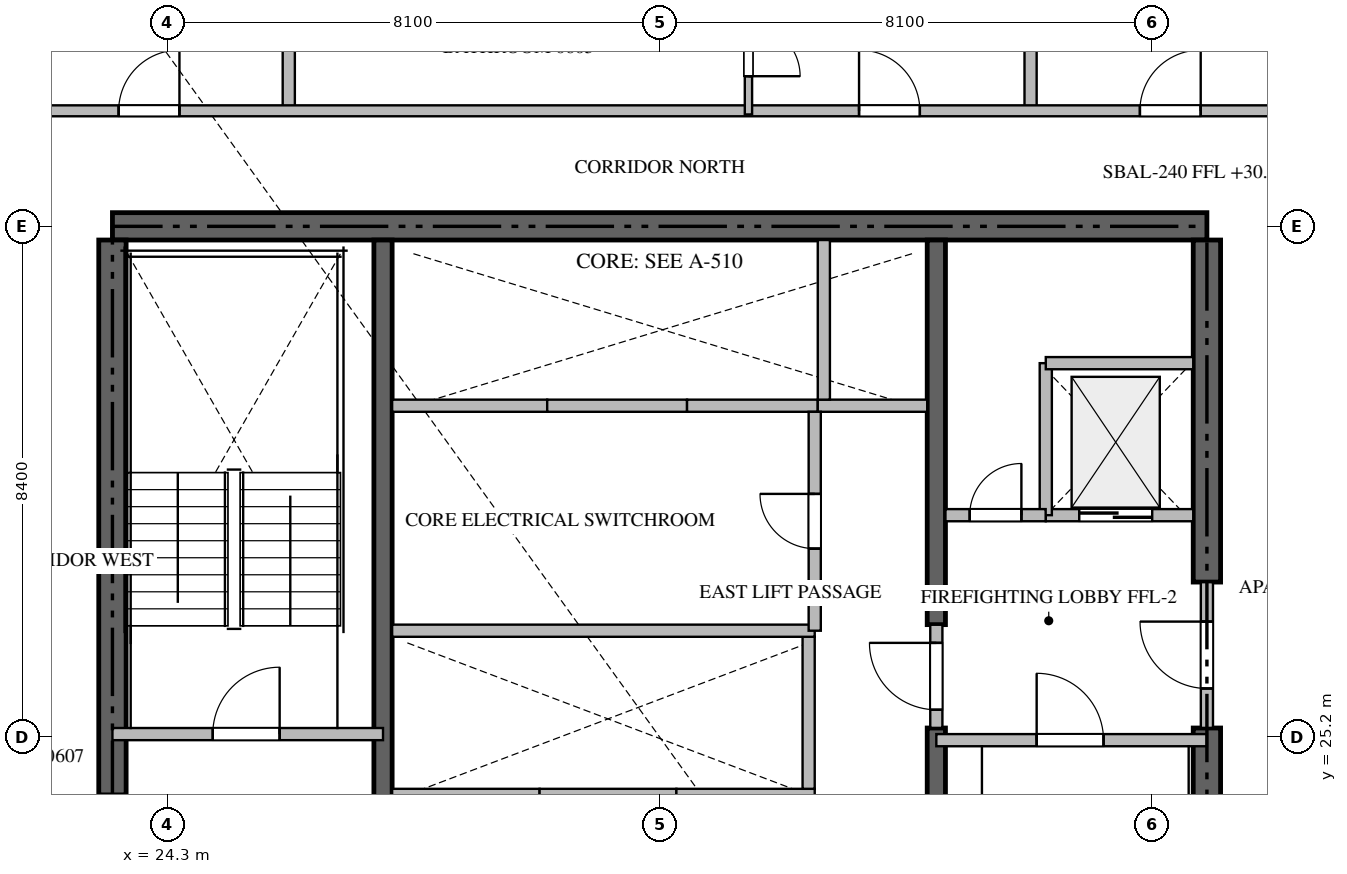
"""IFC4 building model, lengths in metres.
Left out: names, types, materials, properties, quantities, classifications, styles, units other than length and angle.
Written with IfcOpenShell. Run it as: python <this file> out.ifc"""

import sys

from ifc_helpers import new_model, si_unit, direction, frame, frame_2d, origin, place, context, subcontext, project, spatial, rectangle, extrude, source, transform, mapped, element, fill, save


model = new_model("IFC4")
c1 = context("Model", 3, precision=1e-05, world=origin(), true_north=direction((0.0, 1.0)))
c2 = subcontext(c1, "Body", "Model", "MODEL_VIEW")
j1 = project(units=[si_unit("LENGTHUNIT", "METRE"), si_unit("PLANEANGLEUNIT", "RADIAN")], contexts=[c1])
p1 = place(None, origin())
s1 = spatial("IfcSite", under=j1, at=p1, CompositionType="ELEMENT")
p2 = place(p1, origin())
s2 = spatial("IfcBuilding", under=s1, at=p2, CompositionType="ELEMENT")
p3 = place(p2, frame((0.0, 0.0, 30.45)))
s3 = spatial("IfcBuildingStorey", under=s2, at=p3, CompositionType="ELEMENT", Elevation=30.45)
p4 = place(p3, frame((41.4, 33.6, -0.26), z_axis=(0.0, 0.0, 1.0), x_axis=(-1.0, 0.0, 0.0)))
e1 = element("IfcWall", 1, at=p4, inside=s3, PredefinedType="SHEAR", context=c2, shape_type="SweptSolid", body=[
    extrude(rectangle(XDim=18.0, YDim=0.45, at=frame_2d((9.0, 0.0))), origin(), (0.0, 0.0, 1.0), 3.748),
])
p5 = place(p3, frame((23.4, 24.25, -0.26), z_axis=(0.0, 0.0, 1.0), x_axis=(0.0, 1.0, 0.0)))
e2 = element("IfcWall", 2, at=p5, inside=s3, PredefinedType="SHEAR", context=c2, shape_type="SweptSolid", body=[
    extrude(rectangle(XDim=9.125, YDim=0.45, at=frame_2d((4.562, 0.0))), origin(), (0.0, 0.0, 1.0), 3.748),
])
p6 = place(p3, frame((41.4, 17.025, -0.26), z_axis=(0.0, 0.0, 1.0), x_axis=(0.0, 1.0, 0.0)))
e3 = element("IfcWall", 3, at=p6, inside=s3, PredefinedType="SHEAR", context=c2, shape_type="SweptSolid", body=[
    extrude(rectangle(XDim=8.325, YDim=0.45, at=frame_2d((4.163, 0.0))), origin(), (0.0, 0.0, 1.0), 3.748),
])
p7 = place(p3, frame((41.4, 27.75, -0.26), z_axis=(0.0, 0.0, 1.0), x_axis=(0.0, 1.0, 0.0)))
e4 = element("IfcWall", 4, at=p7, inside=s3, PredefinedType="SHEAR", context=c2, shape_type="SweptSolid", body=[
    extrude(rectangle(XDim=5.625, YDim=0.45, at=frame_2d((2.812, 0.0))), origin(), (0.0, 0.0, 1.0), 3.748),
])
p8 = place(p3, frame((27.85, 23.55, -0.26), z_axis=(0.0, 0.0, 1.0), x_axis=(0.0, 1.0, 0.0)))
e5 = element("IfcWall", 5, at=p8, inside=s3, PredefinedType="SHEAR", context=c2, shape_type="SweptSolid", body=[
    extrude(rectangle(XDim=9.825, YDim=0.3, at=frame_2d((4.913, 0.0))), origin(), (0.0, 0.0, 1.0), 3.748),
])
p9 = place(p3, frame((36.95, 17.025, -0.26), z_axis=(0.0, 0.0, 1.0), x_axis=(0.0, 1.0, 0.0)))
e6 = element("IfcWall", 6, at=p9, inside=s3, PredefinedType="SHEAR", context=c2, shape_type="SweptSolid", body=[
    extrude(rectangle(XDim=8.325, YDim=0.3, at=frame_2d((4.163, 0.0))), origin(), (0.0, 0.0, 1.0), 3.748),
])
p10 = place(p3, frame((36.95, 27.05, -0.26), z_axis=(0.0, 0.0, 1.0), x_axis=(0.0, 1.0, 0.0)))
e7 = element("IfcWall", 7, at=p10, inside=s3, PredefinedType="SHEAR", context=c2, shape_type="SweptSolid", body=[
    extrude(rectangle(XDim=6.325, YDim=0.3, at=frame_2d((3.163, 0.0))), origin(), (0.0, 0.0, 1.0), 3.748),
])
p11 = place(p3, frame((23.4, 25.25, 0.0), z_axis=(0.0, 0.0, 1.0), x_axis=(1.0, 0.0, 0.0)))
e8 = element("IfcWall", 8, at=p11, inside=s3, PredefinedType="STANDARD", context=c2, shape_type="SweptSolid", body=[
    extrude(rectangle(XDim=4.45, YDim=0.2, at=frame_2d((2.225, 0.0))), origin(), (0.0, 0.0, 1.0), 3.49),
])
p12 = place(p11, frame((1.65, 0.0, 0.0)))
e9 = element("IfcOpeningElement", 9, at=p12, cuts=e8, PredefinedType="OPENING", context=c2, shape_type="SweptSolid", body=[
    extrude(rectangle(XDim=1.1, YDim=2.15, at=frame_2d((0.55, 1.075))), frame((0.0, 0.11, 0.0), z_axis=(0.0, -1.0, 0.0), x_axis=(1.0, 0.0, 0.0)), (0.0, 0.0, 1.0), 0.22),
])
p13 = place(p3, frame((36.95, 25.15, 0.0), z_axis=(0.0, 0.0, 1.0), x_axis=(1.0, 0.0, 0.0)))
e10 = element("IfcWall", 10, at=p13, inside=s3, PredefinedType="STANDARD", context=c2, shape_type="SweptSolid", body=[
    extrude(rectangle(XDim=4.45, YDim=0.2, at=frame_2d((2.225, 0.0))), origin(), (0.0, 0.0, 1.0), 3.49),
])
p14 = place(p13, frame((1.65, 0.0, 0.0)))
e11 = element("IfcOpeningElement", 11, at=p14, cuts=e10, PredefinedType="OPENING", context=c2, shape_type="SweptSolid", body=[
    extrude(rectangle(XDim=1.1, YDim=2.15, at=frame_2d((0.55, 1.075))), frame((0.0, 0.11, 0.0), z_axis=(0.0, -1.0, 0.0), x_axis=(1.0, 0.0, 0.0)), (0.0, 0.0, 1.0), 0.22),
])
p15 = place(p3, frame((38.75, 28.85, 0.0), z_axis=(0.0, 0.0, 1.0), x_axis=(1.0, 0.0, 0.0)))
e12 = element("IfcWall", 12, at=p15, inside=s3, PredefinedType="STANDARD", context=c2, shape_type="SweptSolid", body=[
    extrude(rectangle(XDim=2.425, YDim=0.2, at=frame_2d((1.212, 0.0))), origin(), (0.0, 0.0, 1.0), 3.49),
])
p16 = place(p15, frame((0.55, 0.0, 0.0)))
e13 = element("IfcOpeningElement", 13, at=p16, cuts=e12, PredefinedType="OPENING", context=c2, shape_type="SweptSolid", body=[
    extrude(rectangle(XDim=1.2, YDim=2.2, at=frame_2d((0.6, 1.1))), frame((0.0, 0.11, 0.0), z_axis=(0.0, -1.0, 0.0), x_axis=(1.0, 0.0, 0.0)), (0.0, 0.0, 1.0), 0.22),
])
p17 = place(p3, frame((28.0, 24.25, 0.0), z_axis=(0.0, 0.0, 1.0), x_axis=(1.0, 0.0, 0.0)))
e14 = element("IfcWall", 14, at=p17, inside=s3, PredefinedType="STANDARD", context=c2, shape_type="SweptSolid", body=[
    extrude(rectangle(XDim=2.425, YDim=0.2, at=frame_2d((1.212, 0.0))), origin(), (0.0, 0.0, 1.0), 3.49),
])
p18 = place(p3, frame((30.425, 24.25, 0.0), z_axis=(0.0, 0.0, 1.0), x_axis=(1.0, 0.0, 0.0)))
e15 = element("IfcWall", 15, at=p18, inside=s3, PredefinedType="STANDARD", context=c2, shape_type="SweptSolid", body=[
    extrude(rectangle(XDim=2.25, YDim=0.2, at=frame_2d((1.125, 0.0))), origin(), (0.0, 0.0, 1.0), 3.49),
])
p19 = place(p3, frame((32.675, 24.25, 0.0), z_axis=(0.0, 0.0, 1.0), x_axis=(1.0, 0.0, 0.0)))
e16 = element("IfcWall", 16, at=p19, inside=s3, PredefinedType="STANDARD", context=c2, shape_type="SweptSolid", body=[
    extrude(rectangle(XDim=2.275, YDim=0.2, at=frame_2d((1.137, 0.0))), origin(), (0.0, 0.0, 1.0), 3.49),
])
p20 = place(p3, frame((34.85, 24.35, 0.0), z_axis=(0.0, 0.0, 1.0), x_axis=(0.0, 1.0, 0.0)))
e17 = element("IfcWall", 17, at=p20, inside=s3, PredefinedType="STANDARD", context=c2, shape_type="SweptSolid", body=[
    extrude(rectangle(XDim=2.5, YDim=0.2, at=frame_2d((1.25, 0.0))), origin(), (0.0, 0.0, 1.0), 3.49),
])
p21 = place(p3, frame((28.0, 30.65, 0.0), z_axis=(0.0, 0.0, 1.0), x_axis=(1.0, 0.0, 0.0)))
e18 = element("IfcWall", 18, at=p21, inside=s3, PredefinedType="STANDARD", context=c2, shape_type="SweptSolid", body=[
    extrude(rectangle(XDim=2.55, YDim=0.2, at=frame_2d((1.275, 0.0))), origin(), (0.0, 0.0, 1.0), 3.49),
])
p22 = place(p3, frame((30.55, 30.65, 0.0), z_axis=(0.0, 0.0, 1.0), x_axis=(1.0, 0.0, 0.0)))
e19 = element("IfcWall", 19, at=p22, inside=s3, PredefinedType="STANDARD", context=c2, shape_type="SweptSolid", body=[
    extrude(rectangle(XDim=2.3, YDim=0.2, at=frame_2d((1.15, 0.0))), origin(), (0.0, 0.0, 1.0), 3.49),
])
p23 = place(p3, frame((32.85, 30.65, 0.0), z_axis=(0.0, 0.0, 1.0), x_axis=(1.0, 0.0, 0.0)))
e20 = element("IfcWall", 20, at=p23, inside=s3, PredefinedType="STANDARD", context=c2, shape_type="SweptSolid", body=[
    extrude(rectangle(XDim=2.15, YDim=0.2, at=frame_2d((1.075, 0.0))), origin(), (0.0, 0.0, 1.0), 3.49),
])
p24 = place(p3, frame((35.0, 30.65, 0.0), z_axis=(0.0, 0.0, 1.0), x_axis=(1.0, 0.0, 0.0)))
e21 = element("IfcWall", 21, at=p24, inside=s3, PredefinedType="STANDARD", context=c2, shape_type="SweptSolid", body=[
    extrude(rectangle(XDim=1.8, YDim=0.2, at=frame_2d((0.9, 0.0))), origin(), (0.0, 0.0, 1.0), 3.49),
])
p25 = place(p3, frame((35.1, 30.75, 0.0), z_axis=(0.0, 0.0, 1.0), x_axis=(0.0, 1.0, 0.0)))
e22 = element("IfcWall", 22, at=p25, inside=s3, PredefinedType="STANDARD", context=c2, shape_type="SweptSolid", body=[
    extrude(rectangle(XDim=2.625, YDim=0.2, at=frame_2d((1.312, 0.0))), origin(), (0.0, 0.0, 1.0), 3.49),
])
p26 = place(p3, frame((38.75, 28.85, 0.0), z_axis=(0.0, 0.0, 1.0), x_axis=(0.0, 1.0, 0.0)))
e23 = element("IfcWall", 23, at=p26, inside=s3, PredefinedType="STANDARD", context=c2, shape_type="SweptSolid", body=[
    extrude(rectangle(XDim=2.5, YDim=0.2, at=frame_2d((1.25, 0.0))), origin(), (0.0, 0.0, 1.0), 3.49),
])
p27 = place(p3, frame((38.75, 31.35, 0.0), z_axis=(0.0, 0.0, 1.0), x_axis=(1.0, 0.0, 0.0)))
e24 = element("IfcWall", 24, at=p27, inside=s3, PredefinedType="STANDARD", context=c2, shape_type="SweptSolid", body=[
    extrude(rectangle(XDim=2.425, YDim=0.2, at=frame_2d((1.212, 0.0))), origin(), (0.0, 0.0, 1.0), 3.49),
])
p28 = place(p3, frame((37.1, 28.85, 0.0), z_axis=(0.0, 0.0, 1.0), x_axis=(1.0, 0.0, 0.0)))
e25 = element("IfcWall", 25, at=p28, inside=s3, PredefinedType="STANDARD", context=c2, shape_type="SweptSolid", body=[
    extrude(rectangle(XDim=1.648, YDim=0.2, at=frame_2d((0.824, 0.0))), origin(), (0.0, 0.0, 1.0), 3.49),
])
p29 = place(p28, frame((0.399, 0.0, 0.0)))
e26 = element("IfcOpeningElement", 26, at=p29, cuts=e25, PredefinedType="OPENING", context=c2, shape_type="SweptSolid", body=[
    extrude(rectangle(XDim=0.85, YDim=2.1, at=frame_2d((0.425, 1.05))), frame((0.0, 0.11, 0.0), z_axis=(0.0, -1.0, 0.0), x_axis=(1.0, 0.0, 0.0)), (0.0, 0.0, 1.0), 0.22),
])
p30 = place(p3, frame((41.4, 25.352, 0.0), z_axis=(0.0, 0.0, 1.0), x_axis=(0.0, 1.0, 0.0)))
e27 = element("IfcWall", 27, at=p30, inside=s3, PredefinedType="STANDARD", context=c2, shape_type="SweptSolid", body=[
    extrude(rectangle(XDim=2.396, YDim=0.2, at=frame_2d((1.198, 0.0))), origin(), (0.0, 0.0, 1.0), 3.49),
])
p31 = place(p30, frame((0.648, 0.0, 0.0)))
e28 = element("IfcOpeningElement", 28, at=p31, cuts=e27, PredefinedType="OPENING", context=c2, shape_type="SweptSolid", body=[
    extrude(rectangle(XDim=1.1, YDim=2.15, at=frame_2d((0.55, 1.075))), frame((0.0, 0.11, 0.0), z_axis=(0.0, -1.0, 0.0), x_axis=(1.0, 0.0, 0.0)), (0.0, 0.0, 1.0), 0.22),
])
p32 = place(p3, frame((36.95, 25.352, 0.0), z_axis=(0.0, 0.0, 1.0), x_axis=(0.0, 1.0, 0.0)))
e29 = element("IfcWall", 29, at=p32, inside=s3, PredefinedType="STANDARD", context=c2, shape_type="SweptSolid", body=[
    extrude(rectangle(XDim=1.696, YDim=0.2, at=frame_2d((0.848, 0.0))), origin(), (0.0, 0.0, 1.0), 3.49),
])
p33 = place(p32, frame((0.298, 0.0, 0.0)))
e30 = element("IfcOpeningElement", 30, at=p33, cuts=e29, PredefinedType="OPENING", context=c2, shape_type="SweptSolid", body=[
    extrude(rectangle(XDim=1.1, YDim=2.15, at=frame_2d((0.55, 1.075))), frame((0.0, 0.11, 0.0), z_axis=(0.0, -1.0, 0.0), x_axis=(1.0, 0.0, 0.0)), (0.0, 0.0, 1.0), 0.22),
])
p34 = place(p3, frame((28.0, 26.95, 0.0), z_axis=(0.0, 0.0, 1.0), x_axis=(1.0, 0.0, 0.0)))
e31 = element("IfcWall", 31, at=p34, inside=s3, PredefinedType="STANDARD", context=c2, shape_type="SweptSolid", body=[
    extrude(rectangle(XDim=6.95, YDim=0.2, at=frame_2d((3.475, 0.0))), origin(), (0.0, 0.0, 1.0), 3.49),
])
p35 = place(p3, frame((34.95, 26.95, 0.0), z_axis=(0.0, 0.0, 1.0), x_axis=(0.0, 1.0, 0.0)))
e32 = element("IfcWall", 32, at=p35, inside=s3, PredefinedType="STANDARD", context=c2, shape_type="SweptSolid", body=[
    extrude(rectangle(XDim=3.6, YDim=0.2, at=frame_2d((1.8, 0.0))), origin(), (0.0, 0.0, 1.0), 3.49),
])
p36 = place(p35, frame((1.35, 0.0, 0.0)))
e33 = element("IfcOpeningElement", 33, at=p36, cuts=e32, PredefinedType="OPENING", context=c2, shape_type="SweptSolid", body=[
    extrude(rectangle(XDim=0.9, YDim=2.1, at=frame_2d((0.45, 1.05))), frame((0.0, 0.11, 0.0), z_axis=(0.0, -1.0, 0.0), x_axis=(1.0, 0.0, 0.0)), (0.0, 0.0, 1.0), 0.22),
])
for number, where, z_axis, x_axis in (
    (34, (26.3, 35.5, 0.0), (0.0, 0.0, 1.0), (0.0, 1.0, 0.0)),
    (35, (38.5, 35.5, 0.0), (0.0, 0.0, 1.0), (0.0, 1.0, 0.0)),
):
    element("IfcWall", number, at=place(p3, frame(where, z_axis=z_axis, x_axis=x_axis)), inside=s3, PredefinedType="PARTITIONING", context=c2, shape_type="SweptSolid", body=[
        extrude(rectangle(XDim=14.618, YDim=0.2, at=frame_2d((7.309, 0.0))), origin(), (0.0, 0.0, 1.0), 3.49),
    ])
p37 = place(p3, frame((21.402, 35.5, 0.0), z_axis=(0.0, 0.0, 1.0), x_axis=(1.0, 0.0, 0.0)))
e36 = element("IfcWall", 36, at=p37, inside=s3, PredefinedType="PARTITIONING", context=c2, shape_type="SweptSolid", body=[
    extrude(rectangle(XDim=21.996, YDim=0.18, at=frame_2d((10.998, 0.0))), origin(), (0.0, 0.0, 1.0), 3.49),
])
p38 = place(p37, frame((2.1, 0.0, 0.0)))
e37 = element("IfcOpeningElement", 37, at=p38, cuts=e36, PredefinedType="OPENING", context=c2, shape_type="SweptSolid", body=[
    extrude(rectangle(XDim=1.0, YDim=2.15, at=frame_2d((0.5, 1.075))), frame((0.0, 0.1, 0.0), z_axis=(0.0, -1.0, 0.0), x_axis=(1.0, 0.0, 0.0)), (0.0, 0.0, 1.0), 0.2),
])
p39 = place(p37, frame((14.277, 0.0, 0.0)))
e38 = element("IfcOpeningElement", 38, at=p39, cuts=e36, PredefinedType="OPENING", context=c2, shape_type="SweptSolid", body=[
    extrude(rectangle(XDim=1.0, YDim=2.15, at=frame_2d((0.5, 1.075))), frame((0.0, 0.1, 0.0), z_axis=(0.0, -1.0, 0.0), x_axis=(1.0, 0.0, 0.0)), (0.0, 0.0, 1.0), 0.2),
])
p40 = place(p37, frame((18.896, 0.0, 0.0)))
e39 = element("IfcOpeningElement", 39, at=p40, cuts=e36, PredefinedType="OPENING", context=c2, shape_type="SweptSolid", body=[
    extrude(rectangle(XDim=1.0, YDim=2.15, at=frame_2d((0.5, 1.075))), frame((0.0, 0.1, 0.0), z_axis=(0.0, -1.0, 0.0), x_axis=(1.0, 0.0, 0.0)), (0.0, 0.0, 1.0), 0.2),
])
p41 = place(p3, frame((33.86, 37.548, 0.0), z_axis=(0.0, 0.0, 1.0), x_axis=(0.0, -1.0, 0.0)))
e40 = element("IfcWall", 40, at=p41, inside=s3, PredefinedType="PARTITIONING", context=c2, shape_type="SweptSolid", body=[
    extrude(rectangle(XDim=2.108, YDim=0.12, at=frame_2d((1.054, 0.0))), origin(), (0.0, 0.0, 1.0), 3.49),
])
p42 = place(p41, frame((0.629, 0.0, 0.0)))
e41 = element("IfcOpeningElement", 41, at=p42, cuts=e40, PredefinedType="OPENING", context=c2, shape_type="SweptSolid", body=[
    extrude(rectangle(XDim=0.85, YDim=2.1, at=frame_2d((0.425, 1.05))), frame((0.0, 0.07, 0.0), z_axis=(0.0, -1.0, 0.0), x_axis=(1.0, 0.0, 0.0)), (0.0, 0.0, 1.0), 0.14),
])
m1 = source(origin(), c2, "Body", "SweptSolid", [
    extrude(rectangle(XDim=1.1, YDim=2.15, at=frame_2d((0.55, 1.075))), frame((0.0, 0.025, 0.0), z_axis=(0.0, -1.0, 0.0), x_axis=(1.0, 0.0, 0.0)), (0.0, 0.0, 1.0), 0.05),
])
p43 = place(p12, origin())
e42 = element("IfcDoor", 42, at=p43, inside=s3, OperationType="SINGLE_SWING_RIGHT", PredefinedType="DOOR", context=c2, shape_type="MappedRepresentation", body=[
    mapped(m1, transform((0.0, 0.0, 0.0), scale=1.0)),
])
fill(e9, e42)
p44 = place(p14, origin())
e43 = element("IfcDoor", 43, at=p44, inside=s3, OperationType="SINGLE_SWING_LEFT", PredefinedType="DOOR", context=c2, shape_type="MappedRepresentation", body=[
    mapped(m1, transform((0.0, 0.0, 0.0), scale=1.0)),
])
fill(e11, e43)
m2 = source(origin(), c2, "Body", "SweptSolid", [
    extrude(rectangle(XDim=1.2, YDim=2.2, at=frame_2d((0.6, 1.1))), frame((0.0, 0.025, 0.0), z_axis=(0.0, -1.0, 0.0), x_axis=(1.0, 0.0, 0.0)), (0.0, 0.0, 1.0), 0.05),
])
p45 = place(p16, origin())
e44 = element("IfcDoor", 44, at=p45, inside=s3, OperationType="DOUBLE_DOOR_SLIDING", PredefinedType="DOOR", context=c2, shape_type="MappedRepresentation", body=[
    mapped(m2, transform((0.0, 0.0, 0.0), scale=1.0)),
])
fill(e13, e44)
m3 = source(origin(), c2, "Body", "SweptSolid", [
    extrude(rectangle(XDim=0.85, YDim=2.1, at=frame_2d((0.425, 1.05))), frame((0.0, 0.025, 0.0), z_axis=(0.0, -1.0, 0.0), x_axis=(1.0, 0.0, 0.0)), (0.0, 0.0, 1.0), 0.05),
])
p46 = place(p29, origin())
e45 = element("IfcDoor", 45, at=p46, inside=s3, OperationType="SINGLE_SWING_RIGHT", PredefinedType="DOOR", context=c2, shape_type="MappedRepresentation", body=[
    mapped(m3, transform((0.0, 0.0, 0.0), scale=1.0)),
])
fill(e26, e45)
p47 = place(p31, origin())
e46 = element("IfcDoor", 46, at=p47, inside=s3, OperationType="SINGLE_SWING_RIGHT", PredefinedType="DOOR", context=c2, shape_type="MappedRepresentation", body=[
    mapped(m1, transform((0.0, 0.0, 0.0), scale=1.0)),
])
fill(e28, e46)
p48 = place(p33, origin())
e47 = element("IfcDoor", 47, at=p48, inside=s3, OperationType="SINGLE_SWING_RIGHT", PredefinedType="DOOR", context=c2, shape_type="MappedRepresentation", body=[
    mapped(m1, transform((0.0, 0.0, 0.0), scale=1.0)),
])
fill(e30, e47)
m4 = source(origin(), c2, "Body", "SweptSolid", [
    extrude(rectangle(XDim=0.9, YDim=2.1, at=frame_2d((0.45, 1.05))), frame((0.0, 0.025, 0.0), z_axis=(0.0, -1.0, 0.0), x_axis=(1.0, 0.0, 0.0)), (0.0, 0.0, 1.0), 0.05),
])
p49 = place(p36, origin())
e48 = element("IfcDoor", 48, at=p49, inside=s3, OperationType="SINGLE_SWING_RIGHT", PredefinedType="DOOR", context=c2, shape_type="MappedRepresentation", body=[
    mapped(m4, transform((0.0, 0.0, 0.0), scale=1.0)),
])
fill(e33, e48)
m5 = source(origin(), c2, "Body", "SweptSolid", [
    extrude(rectangle(XDim=1.0, YDim=2.15, at=frame_2d((0.5, 1.075))), frame((0.0, 0.025, 0.0), z_axis=(0.0, -1.0, 0.0), x_axis=(1.0, 0.0, 0.0)), (0.0, 0.0, 1.0), 0.05),
])
p50 = place(p38, origin())
e49 = element("IfcDoor", 49, at=p50, inside=s3, OperationType="SINGLE_SWING_RIGHT", PredefinedType="DOOR", context=c2, shape_type="MappedRepresentation", body=[
    mapped(m5, transform((0.0, 0.0, 0.0), scale=1.0)),
])
fill(e37, e49)
p51 = place(p39, origin())
e50 = element("IfcDoor", 50, at=p51, inside=s3, OperationType="SINGLE_SWING_LEFT", PredefinedType="DOOR", context=c2, shape_type="MappedRepresentation", body=[
    mapped(m5, transform((0.0, 0.0, 0.0), scale=1.0)),
])
fill(e38, e50)
p52 = place(p40, origin())
e51 = element("IfcDoor", 51, at=p52, inside=s3, OperationType="SINGLE_SWING_RIGHT", PredefinedType="DOOR", context=c2, shape_type="MappedRepresentation", body=[
    mapped(m5, transform((0.0, 0.0, 0.0), scale=1.0)),
])
fill(e39, e51)
p53 = place(p42, origin())
e52 = element("IfcDoor", 52, at=p53, inside=s3, OperationType="SINGLE_SWING_RIGHT", PredefinedType="DOOR", context=c2, shape_type="MappedRepresentation", body=[
    mapped(m3, transform((0.0, 0.0, 0.0), scale=1.0)),
])
fill(e41, e52)
save(model, sys.argv[1])
